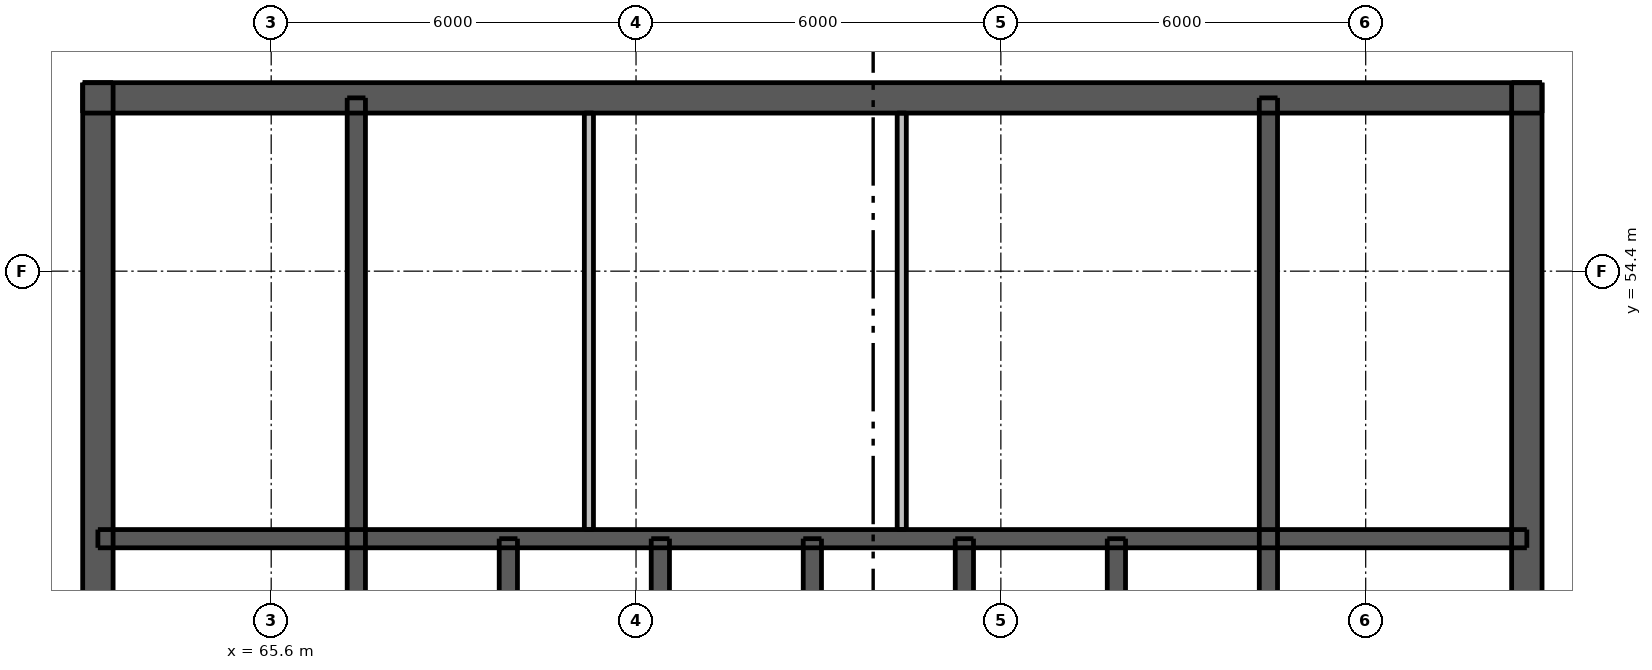
"""IFC4 building model, lengths in metres.
Left out: names, types, materials, properties, quantities, classifications, styles, units other than length and angle.
Written with IfcOpenShell. Run it as: python <this file> out.ifc"""

import sys

from ifc_helpers import new_model, si_unit, direction, frame, frame_2d, origin, place, context, subcontext, project, spatial, rectangle, extrude, element, fill, save


model = new_model("IFC4")
c1 = context("Model", 3, precision=1e-05, world=origin(), true_north=direction((0.0, 1.0)))
c2 = subcontext(c1, "Body", "Model", "MODEL_VIEW")
j1 = project(units=[si_unit("LENGTHUNIT", "METRE"), si_unit("PLANEANGLEUNIT", "RADIAN")], contexts=[c1])
p1 = place(None, origin())
s1 = spatial("IfcSite", under=j1, at=p1, CompositionType="ELEMENT")
p2 = place(p1, origin())
s2 = spatial("IfcBuilding", under=s1, at=p2, CompositionType="ELEMENT")
p3 = place(p2, frame((0.0, 0.0, 255.4)))
s3 = spatial("IfcBuildingStorey", under=s2, at=p3, CompositionType="ELEMENT", Elevation=255.4)
p4 = place(p3, frame((62.5, 57.25, 0.0), z_axis=(0.0, 0.0, 1.0), x_axis=(1.0, 0.0, 0.0)))
e1 = element("IfcWall", 1, at=p4, inside=s3, PredefinedType="SHEAR", context=c2, shape_type="SweptSolid", body=[
    extrude(rectangle(XDim=24.0, YDim=0.5, at=frame_2d((12.0, 0.0))), origin(), (0.0, 0.0, 1.0), 3.05),
])
p5 = place(p4, frame((21.025, 0.0, 0.0)))
e2 = element("IfcOpeningElement", 2, at=p5, cuts=e1, PredefinedType="OPENING", context=c2, shape_type="SweptSolid", body=[
    extrude(rectangle(XDim=1.1, YDim=2.1, at=frame_2d((0.55, 1.05))), frame((0.0, 0.26, 0.0), z_axis=(0.0, -1.0, 0.0), x_axis=(1.0, 0.0, 0.0)), (0.0, 0.0, 1.0), 0.52),
])
p6 = place(p4, frame((1.875, 0.0, 0.0)))
e3 = element("IfcOpeningElement", 3, at=p6, cuts=e1, PredefinedType="OPENING", context=c2, shape_type="SweptSolid", body=[
    extrude(rectangle(XDim=1.1, YDim=2.1, at=frame_2d((0.55, 1.05))), frame((0.0, 0.26, 0.0), z_axis=(0.0, -1.0, 0.0), x_axis=(1.0, 0.0, 0.0)), (0.0, 0.0, 1.0), 0.52),
])
p7 = place(p4, frame((6.038, 0.0, 0.0)))
e4 = element("IfcOpeningElement", 4, at=p7, cuts=e1, PredefinedType="OPENING", context=c2, shape_type="SweptSolid", body=[
    extrude(rectangle(XDim=0.9, YDim=2.1, at=frame_2d((0.45, 1.05))), frame((0.0, 0.26, 0.0), z_axis=(0.0, -1.0, 0.0), x_axis=(1.0, 0.0, 0.0)), (0.0, 0.0, 1.0), 0.52),
])
p8 = place(p4, frame((10.448, 0.0, 0.0)))
e5 = element("IfcOpeningElement", 5, at=p8, cuts=e1, PredefinedType="OPENING", context=c2, shape_type="SweptSolid", body=[
    extrude(rectangle(XDim=0.9, YDim=2.1, at=frame_2d((0.45, 1.05))), frame((0.0, 0.26, 0.0), z_axis=(0.0, -1.0, 0.0), x_axis=(1.0, 0.0, 0.0)), (0.0, 0.0, 1.0), 0.52),
])
p9 = place(p4, frame((15.96, 0.0, 0.0)))
e6 = element("IfcOpeningElement", 6, at=p9, cuts=e1, PredefinedType="OPENING", context=c2, shape_type="SweptSolid", body=[
    extrude(rectangle(XDim=0.9, YDim=2.1, at=frame_2d((0.45, 1.05))), frame((0.0, 0.26, 0.0), z_axis=(0.0, -1.0, 0.0), x_axis=(1.0, 0.0, 0.0)), (0.0, 0.0, 1.0), 0.52),
])
p10 = place(p3, frame((62.75, 33.5, 0.0), z_axis=(0.0, 0.0, 1.0), x_axis=(0.0, 1.0, 0.0)))
e7 = element("IfcWall", 7, at=p10, inside=s3, PredefinedType="SHEAR", context=c2, shape_type="SweptSolid", body=[
    extrude(rectangle(XDim=24.0, YDim=0.5, at=frame_2d((12.0, 0.0))), origin(), (0.0, 0.0, 1.0), 3.05),
])
p11 = place(p10, frame((11.2, 0.0, 0.0)))
e8 = element("IfcOpeningElement", 8, at=p11, cuts=e7, PredefinedType="OPENING", context=c2, shape_type="SweptSolid", body=[
    extrude(rectangle(XDim=1.6, YDim=2.1, at=frame_2d((0.8, 1.05))), frame((0.0, 0.26, 0.0), z_axis=(0.0, -1.0, 0.0), x_axis=(1.0, 0.0, 0.0)), (0.0, 0.0, 1.0), 0.52),
])
p12 = place(p3, frame((86.25, 33.5, 0.0), z_axis=(0.0, 0.0, 1.0), x_axis=(0.0, 1.0, 0.0)))
e9 = element("IfcWall", 9, at=p12, inside=s3, PredefinedType="SHEAR", context=c2, shape_type="SweptSolid", body=[
    extrude(rectangle(XDim=24.0, YDim=0.5, at=frame_2d((12.0, 0.0))), origin(), (0.0, 0.0, 1.0), 3.05),
])
p13 = place(p12, frame((11.2, 0.0, 0.0)))
e10 = element("IfcOpeningElement", 10, at=p13, cuts=e9, PredefinedType="OPENING", context=c2, shape_type="SweptSolid", body=[
    extrude(rectangle(XDim=1.6, YDim=2.1, at=frame_2d((0.8, 1.05))), frame((0.0, 0.26, 0.0), z_axis=(0.0, -1.0, 0.0), x_axis=(1.0, 0.0, 0.0)), (0.0, 0.0, 1.0), 0.52),
])
p14 = place(p3, frame((62.75, 50.0, 0.0), z_axis=(0.0, 0.0, 1.0), x_axis=(1.0, 0.0, 0.0)))
e11 = element("IfcWall", 11, at=p14, inside=s3, PredefinedType="SHEAR", context=c2, shape_type="SweptSolid", body=[
    extrude(rectangle(XDim=23.5, YDim=0.3, at=frame_2d((11.75, 0.0))), origin(), (0.0, 0.0, 1.0), 3.05),
])
for number, where, z_axis, x_axis in (
    (12, (67.0, 47.1, 0.0), (0.0, 0.0, 1.0), (0.0, 1.0, 0.0)),
    (13, (82.0, 47.1, 0.0), (0.0, 0.0, 1.0), (0.0, 1.0, 0.0)),
):
    element("IfcWall", number, at=place(p3, frame(where, z_axis=z_axis, x_axis=x_axis)), inside=s3, PredefinedType="SHEAR", context=c2, shape_type="SweptSolid", body=[
        extrude(rectangle(XDim=10.15, YDim=0.3, at=frame_2d((5.075, 0.0))), origin(), (0.0, 0.0, 1.0), 3.05),
    ])
for number, where, z_axis, x_axis in (
    (14, (69.5, 47.1, 0.0), (0.0, 0.0, 1.0), (0.0, 1.0, 0.0)),
    (15, (72.0, 47.1, 0.0), (0.0, 0.0, 1.0), (0.0, 1.0, 0.0)),
    (16, (74.5, 47.1, 0.0), (0.0, 0.0, 1.0), (0.0, 1.0, 0.0)),
    (17, (77.0, 47.1, 0.0), (0.0, 0.0, 1.0), (0.0, 1.0, 0.0)),
    (18, (79.5, 47.1, 0.0), (0.0, 0.0, 1.0), (0.0, 1.0, 0.0)),
):
    element("IfcWall", number, at=place(p3, frame(where, z_axis=z_axis, x_axis=x_axis)), inside=s3, PredefinedType="SHEAR", context=c2, shape_type="SweptSolid", body=[
        extrude(rectangle(XDim=2.9, YDim=0.3, at=frame_2d((1.45, 0.0))), origin(), (0.0, 0.0, 1.0), 3.05),
    ])
for number, where, z_axis, x_axis in (
    (19, (70.825, 50.15, 0.0), (0.0, 0.0, 1.0), (0.0, 1.0, 0.0)),
    (20, (75.97, 50.15, 0.0), (0.0, 0.0, 1.0), (0.0, 1.0, 0.0)),
):
    element("IfcWall", number, at=place(p3, frame(where, z_axis=z_axis, x_axis=x_axis)), inside=s3, PredefinedType="PLUMBINGWALL", context=c2, shape_type="SweptSolid", body=[
        extrude(rectangle(XDim=6.85, YDim=0.15, at=frame_2d((3.425, 0.0))), origin(), (0.0, 0.0, 1.0), 3.05),
    ])
p15 = place(p5, origin())
e21 = element("IfcDoor", 21, at=p15, inside=s3, OperationType="SINGLE_SWING_RIGHT", PredefinedType="DOOR", context=c2, shape_type="SweptSolid", body=[
    extrude(rectangle(XDim=1.1, YDim=2.1, at=frame_2d((0.55, 1.05))), frame((0.0, -0.188, 0.0), z_axis=(0.0, -1.0, 0.0), x_axis=(1.0, 0.0, 0.0)), (0.0, 0.0, 1.0), 0.05),
])
fill(e2, e21)
p16 = place(p6, origin())
e22 = element("IfcDoor", 22, at=p16, inside=s3, OperationType="SINGLE_SWING_LEFT", PredefinedType="DOOR", context=c2, shape_type="SweptSolid", body=[
    extrude(rectangle(XDim=1.1, YDim=2.1, at=frame_2d((0.55, 1.05))), frame((0.0, -0.188, 0.0), z_axis=(0.0, -1.0, 0.0), x_axis=(1.0, 0.0, 0.0)), (0.0, 0.0, 1.0), 0.05),
])
fill(e3, e22)
p17 = place(p7, origin())
e23 = element("IfcDoor", 23, at=p17, inside=s3, OperationType="SINGLE_SWING_RIGHT", PredefinedType="DOOR", context=c2, shape_type="SweptSolid", body=[
    extrude(rectangle(XDim=0.9, YDim=2.1, at=frame_2d((0.45, 1.05))), frame((0.0, -0.188, 0.0), z_axis=(0.0, -1.0, 0.0), x_axis=(1.0, 0.0, 0.0)), (0.0, 0.0, 1.0), 0.05),
])
fill(e4, e23)
p18 = place(p8, origin())
e24 = element("IfcDoor", 24, at=p18, inside=s3, OperationType="SINGLE_SWING_RIGHT", PredefinedType="DOOR", context=c2, shape_type="SweptSolid", body=[
    extrude(rectangle(XDim=0.9, YDim=2.1, at=frame_2d((0.45, 1.05))), frame((0.0, -0.188, 0.0), z_axis=(0.0, -1.0, 0.0), x_axis=(1.0, 0.0, 0.0)), (0.0, 0.0, 1.0), 0.05),
])
fill(e5, e24)
p19 = place(p9, origin())
e25 = element("IfcDoor", 25, at=p19, inside=s3, OperationType="SINGLE_SWING_RIGHT", PredefinedType="DOOR", context=c2, shape_type="SweptSolid", body=[
    extrude(rectangle(XDim=0.9, YDim=2.1, at=frame_2d((0.45, 1.05))), frame((0.0, -0.188, 0.0), z_axis=(0.0, -1.0, 0.0), x_axis=(1.0, 0.0, 0.0)), (0.0, 0.0, 1.0), 0.05),
])
fill(e6, e25)
save(model, sys.argv[1])
